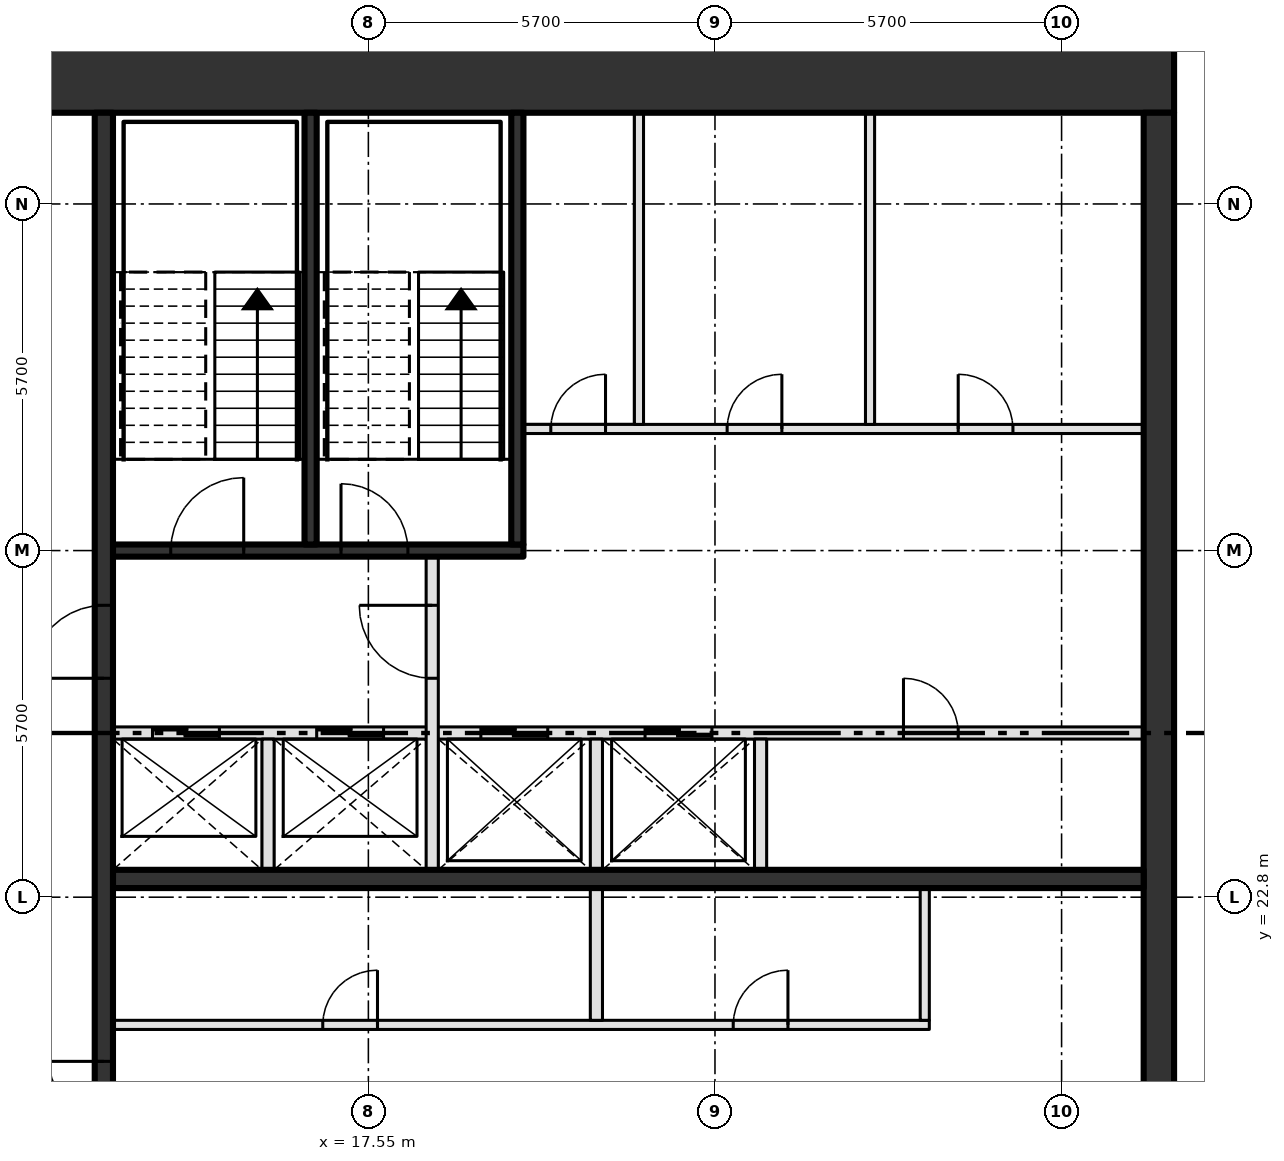
"""IFC4 building model, lengths in metres.
Left out: names, types, materials, properties, quantities, classifications, styles, units other than length and angle.
Written with IfcOpenShell. Run it as: python <this file> out.ifc"""

import sys

from ifc_helpers import new_model, si_unit, direction, frame, frame_2d, origin, place, context, subcontext, project, spatial, rectangle, extrude, element, fill, save


model = new_model("IFC4")
c1 = context("Model", 3, precision=1e-05, world=origin(), true_north=direction((0.0, 1.0)))
c2 = subcontext(c1, "Body", "Model", "MODEL_VIEW")
j1 = project(units=[si_unit("LENGTHUNIT", "METRE"), si_unit("PLANEANGLEUNIT", "RADIAN")], contexts=[c1])
p1 = place(None, origin())
s1 = spatial("IfcSite", under=j1, at=p1, CompositionType="ELEMENT")
p2 = place(p1, origin())
s2 = spatial("IfcBuilding", under=s1, at=p2, CompositionType="ELEMENT")
p3 = place(p2, frame((0.0, 0.0, 370.8)))
s3 = spatial("IfcBuildingStorey", under=s2, at=p3, CompositionType="ELEMENT", Elevation=370.8)
p4 = place(p3, frame((8.0, 36.3, -0.3), z_axis=(0.0, 0.0, 1.0), x_axis=(1.0, 0.0, 0.0)))
e1 = element("IfcWall", 1, at=p4, inside=s3, PredefinedType="SHEAR", context=c2, shape_type="SweptSolid", body=[
    extrude(rectangle(XDim=22.8, YDim=1.2, at=frame_2d((11.4, 0.0))), origin(), (0.0, 0.0, 1.0), 4.2),
])
p5 = place(p4, frame((2.3, 0.0, 0.3)))
e2 = element("IfcOpeningElement", 2, at=p5, cuts=e1, PredefinedType="OPENING", context=c2, shape_type="SweptSolid", body=[
    extrude(rectangle(XDim=1.8, YDim=2.1, at=frame_2d((0.9, 1.05))), frame((0.0, 0.61, 0.0), z_axis=(0.0, -1.0, 0.0), x_axis=(1.0, 0.0, 0.0)), (0.0, 0.0, 1.0), 1.22),
])
p6 = place(p3, frame((30.55, 14.6, -0.3), z_axis=(0.0, 0.0, 1.0), x_axis=(0.0, 1.0, 0.0)))
e3 = element("IfcWall", 3, at=p6, inside=s3, PredefinedType="SHEAR", context=c2, shape_type="SweptSolid", body=[
    extrude(rectangle(XDim=21.1, YDim=0.5, at=frame_2d((10.55, 0.0))), origin(), (0.0, 0.0, 1.0), 4.2),
])
p7 = place(p3, frame((13.35, 20.7, 0.0), z_axis=(0.0, 0.0, 1.0), x_axis=(1.0, 0.0, 0.0)))
e4 = element("IfcWall", 4, at=p7, inside=s3, PredefinedType="PARTITIONING", context=c2, shape_type="SweptSolid", body=[
    extrude(rectangle(XDim=13.425, YDim=0.15, at=frame_2d((6.712, 0.0))), origin(), (0.0, 0.0, 1.0), 3.9),
])
p8 = place(p7, frame((3.45, 0.0, 0.0)))
e5 = element("IfcOpeningElement", 5, at=p8, cuts=e4, PredefinedType="OPENING", context=c2, shape_type="SweptSolid", body=[
    extrude(rectangle(XDim=0.9, YDim=2.1, at=frame_2d((0.45, 1.05))), frame((0.0, 0.085, 0.0), z_axis=(0.0, -1.0, 0.0), x_axis=(1.0, 0.0, 0.0)), (0.0, 0.0, 1.0), 0.17),
])
p9 = place(p7, frame((10.2, 0.0, 0.0)))
e6 = element("IfcOpeningElement", 6, at=p9, cuts=e4, PredefinedType="OPENING", context=c2, shape_type="SweptSolid", body=[
    extrude(rectangle(XDim=0.9, YDim=2.1, at=frame_2d((0.45, 1.05))), frame((0.0, 0.085, 0.0), z_axis=(0.0, -1.0, 0.0), x_axis=(1.0, 0.0, 0.0)), (0.0, 0.0, 1.0), 0.17),
])
p10 = place(p3, frame((13.35, 23.1, 0.0), z_axis=(0.0, 0.0, 1.0), x_axis=(1.0, 0.0, 0.0)))
e7 = element("IfcWall", 7, at=p10, inside=s3, PredefinedType="SHEAR", context=c2, shape_type="SweptSolid", body=[
    extrude(rectangle(XDim=16.95, YDim=0.3, at=frame_2d((8.475, 0.0))), origin(), (0.0, 0.0, 1.0), 3.9),
])
p11 = place(p3, frame((13.35, 25.5, 0.0), z_axis=(0.0, 0.0, 1.0), x_axis=(1.0, 0.0, 0.0)))
e8 = element("IfcWall", 8, at=p11, inside=s3, PredefinedType="SOLIDWALL", context=c2, shape_type="SweptSolid", body=[
    extrude(rectangle(XDim=16.95, YDim=0.2, at=frame_2d((8.475, 0.0))), origin(), (0.0, 0.0, 1.0), 3.9),
])
p12 = place(p11, frame((0.65, 0.0, 0.0)))
e9 = element("IfcOpeningElement", 9, at=p12, cuts=e8, PredefinedType="OPENING", context=c2, shape_type="SweptSolid", body=[
    extrude(rectangle(XDim=1.1, YDim=2.1, at=frame_2d((0.55, 1.05))), frame((0.0, 0.11, 0.0), z_axis=(0.0, -1.0, 0.0), x_axis=(1.0, 0.0, 0.0)), (0.0, 0.0, 1.0), 0.22),
])
p13 = place(p11, frame((3.35, 0.0, 0.0)))
e10 = element("IfcOpeningElement", 10, at=p13, cuts=e8, PredefinedType="OPENING", context=c2, shape_type="SweptSolid", body=[
    extrude(rectangle(XDim=1.1, YDim=2.1, at=frame_2d((0.55, 1.05))), frame((0.0, 0.11, 0.0), z_axis=(0.0, -1.0, 0.0), x_axis=(1.0, 0.0, 0.0)), (0.0, 0.0, 1.0), 0.22),
])
p14 = place(p11, frame((6.05, 0.0, 0.0)))
e11 = element("IfcOpeningElement", 11, at=p14, cuts=e8, PredefinedType="OPENING", context=c2, shape_type="SweptSolid", body=[
    extrude(rectangle(XDim=1.1, YDim=2.1, at=frame_2d((0.55, 1.05))), frame((0.0, 0.11, 0.0), z_axis=(0.0, -1.0, 0.0), x_axis=(1.0, 0.0, 0.0)), (0.0, 0.0, 1.0), 0.22),
])
p15 = place(p11, frame((8.75, 0.0, 0.0)))
e12 = element("IfcOpeningElement", 12, at=p15, cuts=e8, PredefinedType="OPENING", context=c2, shape_type="SweptSolid", body=[
    extrude(rectangle(XDim=1.1, YDim=2.1, at=frame_2d((0.55, 1.05))), frame((0.0, 0.11, 0.0), z_axis=(0.0, -1.0, 0.0), x_axis=(1.0, 0.0, 0.0)), (0.0, 0.0, 1.0), 0.22),
])
p16 = place(p11, frame((13.0, 0.0, 0.0)))
e13 = element("IfcOpeningElement", 13, at=p16, cuts=e8, PredefinedType="OPENING", context=c2, shape_type="SweptSolid", body=[
    extrude(rectangle(XDim=0.9, YDim=2.1, at=frame_2d((0.45, 1.05))), frame((0.0, 0.11, 0.0), z_axis=(0.0, -1.0, 0.0), x_axis=(1.0, 0.0, 0.0)), (0.0, 0.0, 1.0), 0.22),
])
p17 = place(p3, frame((13.35, 28.5, 0.0), z_axis=(0.0, 0.0, 1.0), x_axis=(1.0, 0.0, 0.0)))
e14 = element("IfcWall", 14, at=p17, inside=s3, PredefinedType="SOLIDWALL", context=c2, shape_type="SweptSolid", body=[
    extrude(rectangle(XDim=6.75, YDim=0.2, at=frame_2d((3.375, 0.0))), origin(), (0.0, 0.0, 1.0), 3.9),
])
p18 = place(p17, frame((0.95, 0.0, 0.0)))
e15 = element("IfcOpeningElement", 15, at=p18, cuts=e14, PredefinedType="OPENING", context=c2, shape_type="SweptSolid", body=[
    extrude(rectangle(XDim=1.2, YDim=2.1, at=frame_2d((0.6, 1.05))), frame((0.0, 0.11, 0.0), z_axis=(0.0, -1.0, 0.0), x_axis=(1.0, 0.0, 0.0)), (0.0, 0.0, 1.0), 0.22),
])
p19 = place(p17, frame((3.75, 0.0, 0.0)))
e16 = element("IfcOpeningElement", 16, at=p19, cuts=e14, PredefinedType="OPENING", context=c2, shape_type="SweptSolid", body=[
    extrude(rectangle(XDim=1.1, YDim=2.1, at=frame_2d((0.55, 1.05))), frame((0.0, 0.11, 0.0), z_axis=(0.0, -1.0, 0.0), x_axis=(1.0, 0.0, 0.0)), (0.0, 0.0, 1.0), 0.22),
])
p20 = place(p3, frame((20.1, 30.5, 0.0), z_axis=(0.0, 0.0, 1.0), x_axis=(1.0, 0.0, 0.0)))
e17 = element("IfcWall", 17, at=p20, inside=s3, PredefinedType="PARTITIONING", context=c2, shape_type="SweptSolid", body=[
    extrude(rectangle(XDim=10.2, YDim=0.15, at=frame_2d((5.1, 0.0))), origin(), (0.0, 0.0, 1.0), 3.9),
])
p21 = place(p20, frame((0.45, 0.0, 0.0)))
e18 = element("IfcOpeningElement", 18, at=p21, cuts=e17, PredefinedType="OPENING", context=c2, shape_type="SweptSolid", body=[
    extrude(rectangle(XDim=0.9, YDim=2.1, at=frame_2d((0.45, 1.05))), frame((0.0, 0.085, 0.0), z_axis=(0.0, -1.0, 0.0), x_axis=(1.0, 0.0, 0.0)), (0.0, 0.0, 1.0), 0.17),
])
p22 = place(p20, frame((3.35, 0.0, 0.0)))
e19 = element("IfcOpeningElement", 19, at=p22, cuts=e17, PredefinedType="OPENING", context=c2, shape_type="SweptSolid", body=[
    extrude(rectangle(XDim=0.9, YDim=2.1, at=frame_2d((0.45, 1.05))), frame((0.0, 0.085, 0.0), z_axis=(0.0, -1.0, 0.0), x_axis=(1.0, 0.0, 0.0)), (0.0, 0.0, 1.0), 0.17),
])
p23 = place(p20, frame((7.15, 0.0, 0.0)))
e20 = element("IfcOpeningElement", 20, at=p23, cuts=e17, PredefinedType="OPENING", context=c2, shape_type="SweptSolid", body=[
    extrude(rectangle(XDim=0.9, YDim=2.1, at=frame_2d((0.45, 1.05))), frame((0.0, 0.085, 0.0), z_axis=(0.0, -1.0, 0.0), x_axis=(1.0, 0.0, 0.0)), (0.0, 0.0, 1.0), 0.17),
])
p24 = place(p3, frame((13.2, 14.6, 0.0), z_axis=(0.0, 0.0, 1.0), x_axis=(0.0, 1.0, 0.0)))
e21 = element("IfcWall", 21, at=p24, inside=s3, PredefinedType="SHEAR", context=c2, shape_type="SweptSolid", body=[
    extrude(rectangle(XDim=21.1, YDim=0.3, at=frame_2d((10.55, 0.0))), origin(), (0.0, 0.0, 1.0), 3.9),
])
p25 = place(p24, frame((3.7, 0.0, 0.0)))
e22 = element("IfcOpeningElement", 22, at=p25, cuts=e21, PredefinedType="OPENING", context=c2, shape_type="SweptSolid", body=[
    extrude(rectangle(XDim=1.8, YDim=2.1, at=frame_2d((0.9, 1.05))), frame((0.0, 0.16, 0.0), z_axis=(0.0, -1.0, 0.0), x_axis=(1.0, 0.0, 0.0)), (0.0, 0.0, 1.0), 0.32),
])
p26 = place(p24, frame((11.8, 0.0, 0.0)))
e23 = element("IfcOpeningElement", 23, at=p26, cuts=e21, PredefinedType="OPENING", context=c2, shape_type="SweptSolid", body=[
    extrude(rectangle(XDim=1.2, YDim=2.1, at=frame_2d((0.6, 1.05))), frame((0.0, 0.16, 0.0), z_axis=(0.0, -1.0, 0.0), x_axis=(1.0, 0.0, 0.0)), (0.0, 0.0, 1.0), 0.32),
])
p27 = place(p3, frame((15.9, 23.25, 0.0), z_axis=(0.0, 0.0, 1.0), x_axis=(0.0, 1.0, 0.0)))
e24 = element("IfcWall", 24, at=p27, inside=s3, PredefinedType="SOLIDWALL", context=c2, shape_type="SweptSolid", body=[
    extrude(rectangle(XDim=2.15, YDim=0.2, at=frame_2d((1.075, 0.0))), origin(), (0.0, 0.0, 1.0), 3.9),
])
p28 = place(p3, frame((16.6, 28.6, 0.0), z_axis=(0.0, 0.0, 1.0), x_axis=(0.0, 1.0, 0.0)))
e25 = element("IfcWall", 25, at=p28, inside=s3, PredefinedType="SOLIDWALL", context=c2, shape_type="SweptSolid", body=[
    extrude(rectangle(XDim=7.1, YDim=0.2, at=frame_2d((3.55, 0.0))), origin(), (0.0, 0.0, 1.0), 3.9),
])
p29 = place(p3, frame((18.6, 23.25, 0.0), z_axis=(0.0, 0.0, 1.0), x_axis=(0.0, 1.0, 0.0)))
e26 = element("IfcWall", 26, at=p29, inside=s3, PredefinedType="SOLIDWALL", context=c2, shape_type="SweptSolid", body=[
    extrude(rectangle(XDim=5.15, YDim=0.2, at=frame_2d((2.575, 0.0))), origin(), (0.0, 0.0, 1.0), 3.9),
])
p30 = place(p29, frame((3.15, 0.0, 0.0)))
e27 = element("IfcOpeningElement", 27, at=p30, cuts=e26, PredefinedType="OPENING", context=c2, shape_type="SweptSolid", body=[
    extrude(rectangle(XDim=1.2, YDim=2.1, at=frame_2d((0.6, 1.05))), frame((0.0, 0.11, 0.0), z_axis=(0.0, -1.0, 0.0), x_axis=(1.0, 0.0, 0.0)), (0.0, 0.0, 1.0), 0.22),
])
p31 = place(p3, frame((20.0, 28.6, 0.0), z_axis=(0.0, 0.0, 1.0), x_axis=(0.0, 1.0, 0.0)))
e28 = element("IfcWall", 28, at=p31, inside=s3, PredefinedType="SOLIDWALL", context=c2, shape_type="SweptSolid", body=[
    extrude(rectangle(XDim=7.1, YDim=0.2, at=frame_2d((3.55, 0.0))), origin(), (0.0, 0.0, 1.0), 3.9),
])
p32 = place(p3, frame((21.3, 20.775, 0.0), z_axis=(0.0, 0.0, 1.0), x_axis=(0.0, 1.0, 0.0)))
e29 = element("IfcWall", 29, at=p32, inside=s3, PredefinedType="SOLIDWALL", context=c2, shape_type="SweptSolid", body=[
    extrude(rectangle(XDim=4.625, YDim=0.2, at=frame_2d((2.312, 0.0))), origin(), (0.0, 0.0, 1.0), 3.9),
])
p33 = place(p3, frame((22.0, 30.575, 0.0), z_axis=(0.0, 0.0, 1.0), x_axis=(0.0, 1.0, 0.0)))
e30 = element("IfcWall", 30, at=p33, inside=s3, PredefinedType="PARTITIONING", context=c2, shape_type="SweptSolid", body=[
    extrude(rectangle(XDim=5.125, YDim=0.15, at=frame_2d((2.562, 0.0))), origin(), (0.0, 0.0, 1.0), 3.9),
])
p34 = place(p3, frame((24.0, 23.25, 0.0), z_axis=(0.0, 0.0, 1.0), x_axis=(0.0, 1.0, 0.0)))
e31 = element("IfcWall", 31, at=p34, inside=s3, PredefinedType="SOLIDWALL", context=c2, shape_type="SweptSolid", body=[
    extrude(rectangle(XDim=2.15, YDim=0.2, at=frame_2d((1.075, 0.0))), origin(), (0.0, 0.0, 1.0), 3.9),
])
p35 = place(p3, frame((25.8, 30.575, 0.0), z_axis=(0.0, 0.0, 1.0), x_axis=(0.0, 1.0, 0.0)))
e32 = element("IfcWall", 32, at=p35, inside=s3, PredefinedType="PARTITIONING", context=c2, shape_type="SweptSolid", body=[
    extrude(rectangle(XDim=5.125, YDim=0.15, at=frame_2d((2.562, 0.0))), origin(), (0.0, 0.0, 1.0), 3.9),
])
p36 = place(p3, frame((26.7, 20.775, 0.0), z_axis=(0.0, 0.0, 1.0), x_axis=(0.0, 1.0, 0.0)))
e33 = element("IfcWall", 33, at=p36, inside=s3, PredefinedType="PARTITIONING", context=c2, shape_type="SweptSolid", body=[
    extrude(rectangle(XDim=2.175, YDim=0.15, at=frame_2d((1.087, 0.0))), origin(), (0.0, 0.0, 1.0), 3.9),
])
p37 = place(p12, origin())
e34 = element("IfcDoor", 34, at=p37, inside=s3, OperationType="SLIDING_TO_LEFT", PredefinedType="DOOR", context=c2, shape_type="SweptSolid", body=[
    extrude(rectangle(XDim=1.1, YDim=2.1, at=frame_2d((0.55, 1.05))), frame((0.0, 0.025, 0.0), z_axis=(0.0, -1.0, 0.0), x_axis=(1.0, 0.0, 0.0)), (0.0, 0.0, 1.0), 0.05),
])
fill(e9, e34)
p38 = place(p13, origin())
e35 = element("IfcDoor", 35, at=p38, inside=s3, OperationType="SLIDING_TO_LEFT", PredefinedType="DOOR", context=c2, shape_type="SweptSolid", body=[
    extrude(rectangle(XDim=1.1, YDim=2.1, at=frame_2d((0.55, 1.05))), frame((0.0, 0.025, 0.0), z_axis=(0.0, -1.0, 0.0), x_axis=(1.0, 0.0, 0.0)), (0.0, 0.0, 1.0), 0.05),
])
fill(e10, e35)
p39 = place(p14, origin())
e36 = element("IfcDoor", 36, at=p39, inside=s3, OperationType="SLIDING_TO_LEFT", PredefinedType="DOOR", context=c2, shape_type="SweptSolid", body=[
    extrude(rectangle(XDim=1.1, YDim=2.1, at=frame_2d((0.55, 1.05))), frame((0.0, 0.025, 0.0), z_axis=(0.0, -1.0, 0.0), x_axis=(1.0, 0.0, 0.0)), (0.0, 0.0, 1.0), 0.05),
])
fill(e11, e36)
p40 = place(p15, origin())
e37 = element("IfcDoor", 37, at=p40, inside=s3, OperationType="SLIDING_TO_LEFT", PredefinedType="DOOR", context=c2, shape_type="SweptSolid", body=[
    extrude(rectangle(XDim=1.1, YDim=2.1, at=frame_2d((0.55, 1.05))), frame((0.0, 0.025, 0.0), z_axis=(0.0, -1.0, 0.0), x_axis=(1.0, 0.0, 0.0)), (0.0, 0.0, 1.0), 0.05),
])
fill(e12, e37)
p41 = place(p8, origin())
e38 = element("IfcDoor", 38, at=p41, inside=s3, OperationType="SINGLE_SWING_RIGHT", PredefinedType="DOOR", context=c2, shape_type="SweptSolid", body=[
    extrude(rectangle(XDim=0.9, YDim=2.1, at=frame_2d((0.45, 1.05))), frame((0.0, 0.025, 0.0), z_axis=(0.0, -1.0, 0.0), x_axis=(1.0, 0.0, 0.0)), (0.0, 0.0, 1.0), 0.05),
])
fill(e5, e38)
p42 = place(p9, origin())
e39 = element("IfcDoor", 39, at=p42, inside=s3, OperationType="SINGLE_SWING_RIGHT", PredefinedType="DOOR", context=c2, shape_type="SweptSolid", body=[
    extrude(rectangle(XDim=0.9, YDim=2.1, at=frame_2d((0.45, 1.05))), frame((0.0, 0.025, 0.0), z_axis=(0.0, -1.0, 0.0), x_axis=(1.0, 0.0, 0.0)), (0.0, 0.0, 1.0), 0.05),
])
fill(e6, e39)
p43 = place(p16, origin())
e40 = element("IfcDoor", 40, at=p43, inside=s3, OperationType="SINGLE_SWING_LEFT", PredefinedType="DOOR", context=c2, shape_type="SweptSolid", body=[
    extrude(rectangle(XDim=0.9, YDim=2.1, at=frame_2d((0.45, 1.05))), frame((0.0, 0.025, 0.0), z_axis=(0.0, -1.0, 0.0), x_axis=(1.0, 0.0, 0.0)), (0.0, 0.0, 1.0), 0.05),
])
fill(e13, e40)
p44 = place(p21, origin())
e41 = element("IfcDoor", 41, at=p44, inside=s3, OperationType="SINGLE_SWING_RIGHT", PredefinedType="DOOR", context=c2, shape_type="SweptSolid", body=[
    extrude(rectangle(XDim=0.9, YDim=2.1, at=frame_2d((0.45, 1.05))), frame((0.0, 0.025, 0.0), z_axis=(0.0, -1.0, 0.0), x_axis=(1.0, 0.0, 0.0)), (0.0, 0.0, 1.0), 0.05),
])
fill(e18, e41)
p45 = place(p22, origin())
e42 = element("IfcDoor", 42, at=p45, inside=s3, OperationType="SINGLE_SWING_RIGHT", PredefinedType="DOOR", context=c2, shape_type="SweptSolid", body=[
    extrude(rectangle(XDim=0.9, YDim=2.1, at=frame_2d((0.45, 1.05))), frame((0.0, 0.025, 0.0), z_axis=(0.0, -1.0, 0.0), x_axis=(1.0, 0.0, 0.0)), (0.0, 0.0, 1.0), 0.05),
])
fill(e19, e42)
p46 = place(p23, origin())
e43 = element("IfcDoor", 43, at=p46, inside=s3, OperationType="SINGLE_SWING_LEFT", PredefinedType="DOOR", context=c2, shape_type="SweptSolid", body=[
    extrude(rectangle(XDim=0.9, YDim=2.1, at=frame_2d((0.45, 1.05))), frame((0.0, 0.025, 0.0), z_axis=(0.0, -1.0, 0.0), x_axis=(1.0, 0.0, 0.0)), (0.0, 0.0, 1.0), 0.05),
])
fill(e20, e43)
p47 = place(p18, origin())
e44 = element("IfcDoor", 44, at=p47, inside=s3, OperationType="SINGLE_SWING_RIGHT", PredefinedType="DOOR", context=c2, shape_type="SweptSolid", body=[
    extrude(rectangle(XDim=1.2, YDim=2.1, at=frame_2d((0.6, 1.05))), frame((0.0, 0.025, 0.0), z_axis=(0.0, -1.0, 0.0), x_axis=(1.0, 0.0, 0.0)), (0.0, 0.0, 1.0), 0.05),
])
fill(e15, e44)
p48 = place(p19, origin())
e45 = element("IfcDoor", 45, at=p48, inside=s3, OperationType="SINGLE_SWING_LEFT", PredefinedType="DOOR", context=c2, shape_type="SweptSolid", body=[
    extrude(rectangle(XDim=1.1, YDim=2.1, at=frame_2d((0.55, 1.05))), frame((0.0, 0.025, 0.0), z_axis=(0.0, -1.0, 0.0), x_axis=(1.0, 0.0, 0.0)), (0.0, 0.0, 1.0), 0.05),
])
fill(e16, e45)
p49 = place(p25, origin())
e46 = element("IfcDoor", 46, at=p49, inside=s3, OperationType="DOUBLE_DOOR_SINGLE_SWING", PredefinedType="DOOR", context=c2, shape_type="SweptSolid", body=[
    extrude(rectangle(XDim=1.8, YDim=2.1, at=frame_2d((0.9, 1.05))), frame((0.0, 0.025, 0.0), z_axis=(0.0, -1.0, 0.0), x_axis=(1.0, 0.0, 0.0)), (0.0, 0.0, 1.0), 0.05),
])
fill(e22, e46)
p50 = place(p26, origin())
e47 = element("IfcDoor", 47, at=p50, inside=s3, OperationType="SINGLE_SWING_LEFT", PredefinedType="DOOR", context=c2, shape_type="SweptSolid", body=[
    extrude(rectangle(XDim=1.2, YDim=2.1, at=frame_2d((0.6, 1.05))), frame((0.0, 0.025, 0.0), z_axis=(0.0, -1.0, 0.0), x_axis=(1.0, 0.0, 0.0)), (0.0, 0.0, 1.0), 0.05),
])
fill(e23, e47)
p51 = place(p30, origin())
e48 = element("IfcDoor", 48, at=p51, inside=s3, OperationType="SINGLE_SWING_RIGHT", PredefinedType="DOOR", context=c2, shape_type="SweptSolid", body=[
    extrude(rectangle(XDim=1.2, YDim=2.1, at=frame_2d((0.6, 1.05))), frame((0.0, 0.025, 0.0), z_axis=(0.0, -1.0, 0.0), x_axis=(1.0, 0.0, 0.0)), (0.0, 0.0, 1.0), 0.05),
])
fill(e27, e48)
save(model, sys.argv[1])
